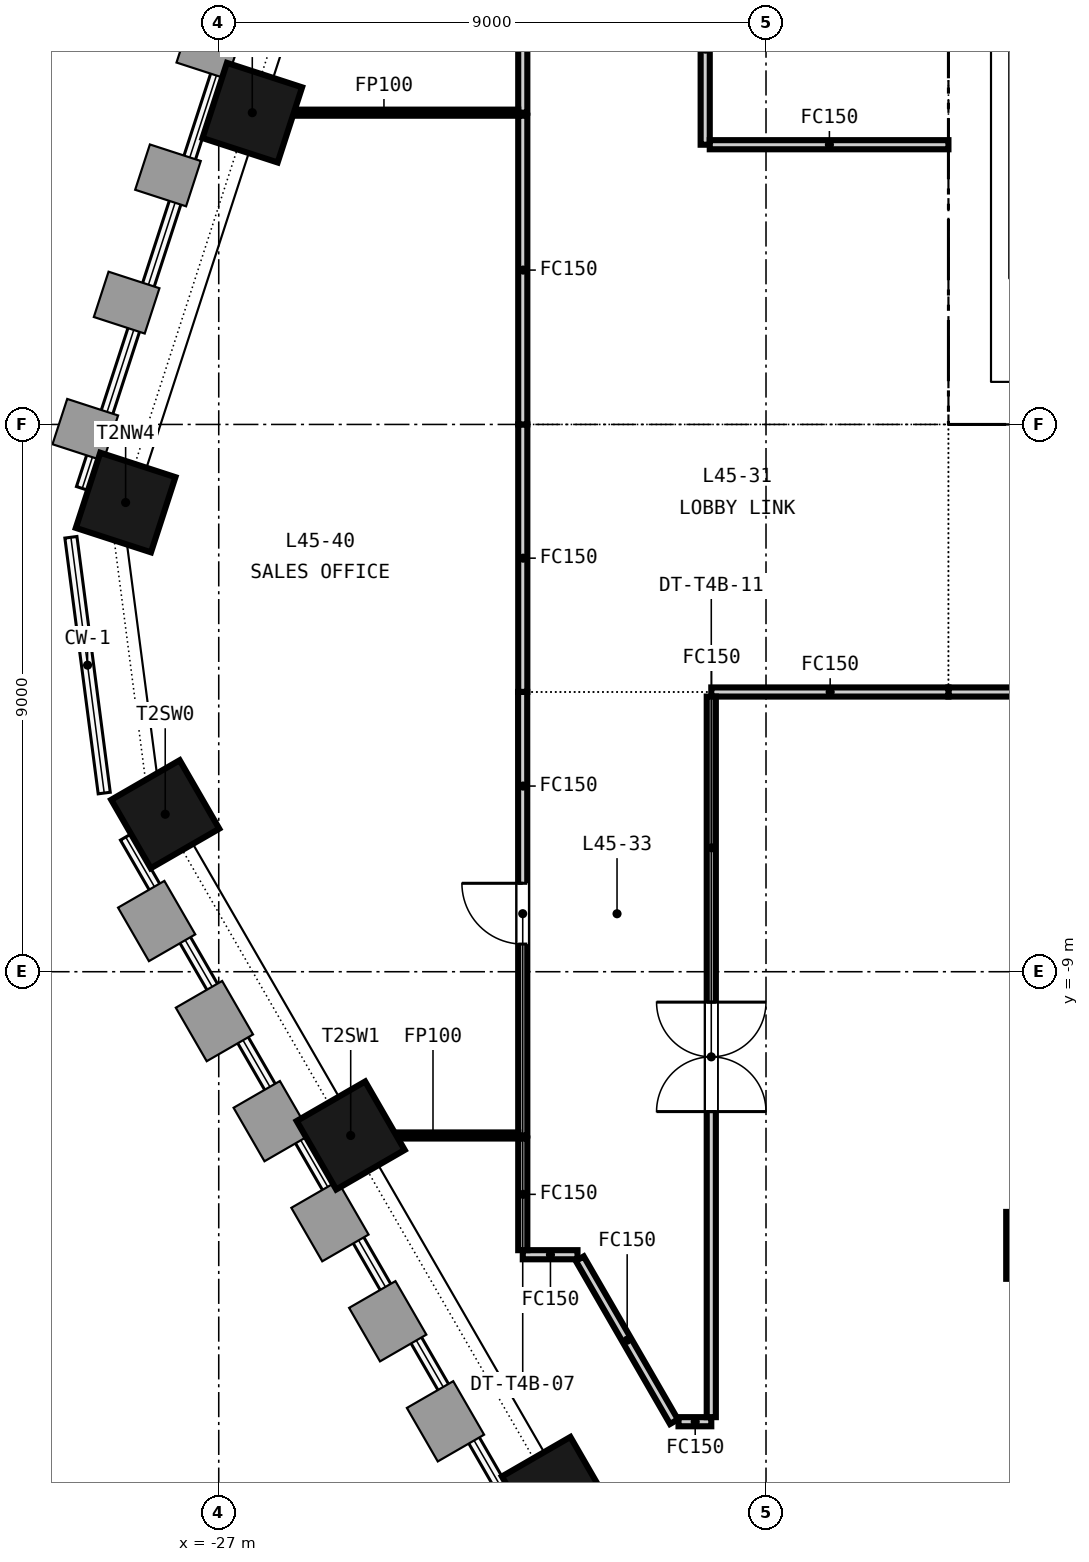
"""IFC4 building model, lengths in metres.
Left out: names, types, materials, properties, quantities, classifications, styles, units other than length and angle.
Written with IfcOpenShell. Run it as: python <this file> out.ifc"""

import sys

from ifc_helpers import new_model, si_unit, direction, frame, frame_2d, origin, origin_2d, place, context, subcontext, project, spatial, rectangle, extrude, element, fill, save


model = new_model("IFC4")
c1 = context("Model", 3, precision=1e-05, world=origin(), true_north=direction((0.0, 1.0)))
c2 = subcontext(c1, "Body", "Model", "MODEL_VIEW")
j1 = project(units=[si_unit("LENGTHUNIT", "METRE"), si_unit("PLANEANGLEUNIT", "RADIAN")], contexts=[c1])
p1 = place(None, origin())
s1 = spatial("IfcSite", under=j1, at=p1, CompositionType="ELEMENT")
p2 = place(p1, origin())
s2 = spatial("IfcBuilding", under=s1, at=p2, CompositionType="ELEMENT")
p3 = place(p2, frame((0.0, 0.0, 181.75)))
s3 = spatial("IfcBuildingStorey", under=s2, at=p3, CompositionType="ELEMENT", Elevation=181.75)
p4 = place(p3, frame((-15.0, 0.35, -0.15), z_axis=(0.0, 0.0, 1.0), x_axis=(1.0, 0.0, 0.0)))
e1 = element("IfcWall", 1, at=p4, inside=s3, PredefinedType="SOLIDWALL", context=c2, shape_type="SweptSolid", body=[
    extrude(rectangle(XDim=30.0, YDim=0.7, at=frame_2d((15.0, 0.0))), origin(), (0.0, 0.0, 1.0), 3.65),
])
p5 = place(p4, frame((5.8, 0.0, 0.15)))
e2 = element("IfcOpeningElement", 2, at=p5, cuts=e1, PredefinedType="OPENING", context=c2, shape_type="SweptSolid", body=[
    extrude(rectangle(XDim=2.4, YDim=2.4, at=frame_2d((1.2, 1.2))), frame((0.0, 0.36, 0.0), z_axis=(0.0, -1.0, 0.0), x_axis=(1.0, 0.0, 0.0)), (0.0, 0.0, 1.0), 0.72),
])
p6 = place(p4, frame((13.8, 0.0, 0.15)))
e3 = element("IfcOpeningElement", 3, at=p6, cuts=e1, PredefinedType="OPENING", context=c2, shape_type="SweptSolid", body=[
    extrude(rectangle(XDim=2.4, YDim=2.4, at=frame_2d((1.2, 1.2))), frame((0.0, 0.36, 0.0), z_axis=(0.0, -1.0, 0.0), x_axis=(1.0, 0.0, 0.0)), (0.0, 0.0, 1.0), 0.72),
])
p7 = place(p4, frame((21.8, 0.0, 0.15)))
e4 = element("IfcOpeningElement", 4, at=p7, cuts=e1, PredefinedType="OPENING", context=c2, shape_type="SweptSolid", body=[
    extrude(rectangle(XDim=2.4, YDim=2.4, at=frame_2d((1.2, 1.2))), frame((0.0, 0.36, 0.0), z_axis=(0.0, -1.0, 0.0), x_axis=(1.0, 0.0, 0.0)), (0.0, 0.0, 1.0), 0.72),
])
p8 = place(p4, frame((1.5, 0.0, 0.15)))
e5 = element("IfcOpeningElement", 5, at=p8, cuts=e1, PredefinedType="OPENING", context=c2, shape_type="SweptSolid", body=[
    extrude(rectangle(XDim=1.2, YDim=2.1, at=frame_2d((0.6, 1.05))), frame((0.0, 0.36, 0.0), z_axis=(0.0, -1.0, 0.0), x_axis=(1.0, 0.0, 0.0)), (0.0, 0.0, 1.0), 0.72),
])
p9 = place(p4, frame((27.3, 0.0, 0.15)))
e6 = element("IfcOpeningElement", 6, at=p9, cuts=e1, PredefinedType="OPENING", context=c2, shape_type="SweptSolid", body=[
    extrude(rectangle(XDim=1.2, YDim=2.1, at=frame_2d((0.6, 1.05))), frame((0.0, 0.36, 0.0), z_axis=(0.0, -1.0, 0.0), x_axis=(1.0, 0.0, 0.0)), (0.0, 0.0, 1.0), 0.72),
])
p10 = place(p3, frame((-14.65, 0.7, -0.15), z_axis=(0.0, 0.0, 1.0), x_axis=(0.0, 1.0, 0.0)))
e7 = element("IfcWall", 7, at=p10, inside=s3, PredefinedType="SOLIDWALL", context=c2, shape_type="SweptSolid", body=[
    extrude(rectangle(XDim=13.6, YDim=0.7, at=frame_2d((6.8, 0.0))), origin(), (0.0, 0.0, 1.0), 3.65),
])
for number, where, z_axis, x_axis in (
    (8, (-26.448, 5.127, -0.15), (0.0, 0.0, 1.0), (-0.309, -0.951, 0.0)),
    (9, (-28.531, -1.284, -0.15), (0.0, 0.0, 1.0), (-0.309, -0.951, 0.0)),
    (10, (-27.88, -6.41, -0.15), (0.0, 0.0, 1.0), (0.5, -0.866, 0.0)),
    (11, (-24.83, -11.693, -0.15), (0.0, 0.0, 1.0), (0.5, -0.866, 0.0)),
    (12, (-21.455, -17.539, -0.15), (0.0, 0.0, 1.0), (0.5, -0.866, 0.0)),
):
    element("IfcColumn", number, at=place(p3, frame(where, z_axis=z_axis, x_axis=x_axis)), inside=s3, PredefinedType="COLUMN", context=c2, shape_type="SweptSolid", body=[
        extrude(rectangle(XDim=1.3, YDim=1.3, at=origin_2d()), origin(), (0.0, 0.0, 1.0), 3.65),
    ])
p11 = place(p3, frame((-13.5, -13.5, -0.15), z_axis=(0.0, 0.0, 1.0), x_axis=(1.0, 0.0, 0.0)))
e13 = element("IfcColumn", 13, at=p11, inside=s3, PredefinedType="COLUMN", context=c2, shape_type="SweptSolid", body=[
    extrude(rectangle(XDim=1.1, YDim=1.1, at=origin_2d()), origin(), (0.0, 0.0, 1.0), 3.65),
])
p12 = place(p3, frame((-14.15, 0.7, 0.0), z_axis=(0.0, 0.0, 1.0), x_axis=(0.0, 1.0, 0.0)))
e14 = element("IfcWall", 14, at=p12, inside=s3, PredefinedType="SOLIDWALL", context=c2, shape_type="SweptSolid", body=[
    extrude(rectangle(XDim=13.6, YDim=0.3, at=frame_2d((6.8, 0.0))), origin(), (0.0, 0.0, 1.0), 3.5),
])
p13 = place(p3, frame((0.095, -4.4, 0.0), z_axis=(0.0, 0.0, 1.0), x_axis=(-1.0, 0.0, 0.0)))
e15 = element("IfcWall", 15, at=p13, inside=s3, PredefinedType="PARTITIONING", context=c2, shape_type="SweptSolid", body=[
    extrude(rectangle(XDim=15.095, YDim=0.15, at=frame_2d((7.547, 0.0))), origin(), (0.0, 0.0, 1.0), 2.741),
])
p14 = place(p13, frame((6.647, 0.0, 0.0)))
e16 = element("IfcOpeningElement", 16, at=p14, cuts=e15, PredefinedType="OPENING", context=c2, shape_type="SweptSolid", body=[
    extrude(rectangle(XDim=1.8, YDim=2.1, at=frame_2d((0.9, 1.05))), frame((0.0, 0.085, 0.0), z_axis=(0.0, -1.0, 0.0), x_axis=(1.0, 0.0, 0.0)), (0.0, 0.0, 1.0), 0.17),
])
p15 = place(p3, frame((-15.0, -4.4, 0.0), z_axis=(0.0, 0.0, 1.0), x_axis=(-1.0, 0.0, 0.0)))
e17 = element("IfcWall", 17, at=p15, inside=s3, PredefinedType="PARTITIONING", context=c2, shape_type="SweptSolid", body=[
    extrude(rectangle(XDim=3.9, YDim=0.15, at=frame_2d((1.95, 0.0))), origin(), (0.0, 0.0, 1.0), 2.741),
])
p16 = place(p3, frame((-19.0, 7.743, 0.0), z_axis=(0.0, 0.0, 1.0), x_axis=(0.0, -1.0, 0.0)))
e18 = element("IfcWall", 18, at=p16, inside=s3, PredefinedType="PARTITIONING", context=c2, shape_type="SweptSolid", body=[
    extrude(rectangle(XDim=3.143, YDim=0.15, at=frame_2d((1.571, 0.0))), origin(), (0.0, 0.0, 1.0), 2.741),
])
p17 = place(p3, frame((-22.0, -11.693, 0.0), z_axis=(0.0, 0.0, 1.0), x_axis=(-0.000267728647, 0.999999964161, 0.0)))
e19 = element("IfcWall", 19, at=p17, inside=s3, PredefinedType="PARTITIONING", context=c2, shape_type="SweptSolid", body=[
    extrude(rectangle(XDim=7.295, YDim=0.15, at=frame_2d((3.647, 0.0))), origin(), (0.0, 0.0, 1.0), 2.741),
])
p18 = place(p17, frame((3.147, 0.0, 0.0)))
e20 = element("IfcOpeningElement", 20, at=p18, cuts=e19, PredefinedType="OPENING", context=c2, shape_type="SweptSolid", body=[
    extrude(rectangle(XDim=1.0, YDim=2.1, at=frame_2d((0.5, 1.05))), frame((0.0, 0.085, 0.0), z_axis=(0.0, -1.0, 0.0), x_axis=(1.0, 0.0, 0.0)), (0.0, 0.0, 1.0), 0.17),
])
p19 = place(p3, frame((-21.1, -13.654, 0.0), z_axis=(0.0, 0.0, 1.0), x_axis=(-1.0, 0.0, 0.0)))
e21 = element("IfcWall", 21, at=p19, inside=s3, PredefinedType="PARTITIONING", context=c2, shape_type="SweptSolid", body=[
    extrude(rectangle(XDim=0.9, YDim=0.15, at=frame_2d((0.45, 0.0))), origin(), (0.0, 0.0, 1.0), 2.741),
])
p20 = place(p3, frame((-19.514, -16.4, 0.0), z_axis=(0.0, 0.0, 1.0), x_axis=(-0.500184316454, 0.865918962475, 0.0)))
e22 = element("IfcWall", 22, at=p20, inside=s3, PredefinedType="PARTITIONING", context=c2, shape_type="SweptSolid", body=[
    extrude(rectangle(XDim=3.096, YDim=0.15, at=frame_2d((1.548, 0.0))), origin(), (0.0, 0.0, 1.0), 2.741),
])
p21 = place(p3, frame((-18.9, -16.4, 0.0), z_axis=(0.0, 0.0, 1.0), x_axis=(-1.0, 0.0, 0.0)))
e23 = element("IfcWall", 23, at=p21, inside=s3, PredefinedType="PARTITIONING", context=c2, shape_type="SweptSolid", body=[
    extrude(rectangle(XDim=0.539, YDim=0.15, at=frame_2d((0.27, 0.0))), origin(), (0.0, 0.0, 1.0), 2.741),
])
p22 = place(p3, frame((-18.9, -4.475, 0.0), z_axis=(0.0, 0.0, 1.0), x_axis=(0.0, -1.0, 0.0)))
e24 = element("IfcWall", 24, at=p22, inside=s3, PredefinedType="PARTITIONING", context=c2, shape_type="SweptSolid", body=[
    extrude(rectangle(XDim=11.85, YDim=0.15, at=frame_2d((5.925, 0.0))), origin(), (0.0, 0.0, 1.0), 2.741),
])
p23 = place(p22, frame((5.025, 0.0, 0.0)))
e25 = element("IfcOpeningElement", 25, at=p23, cuts=e24, PredefinedType="OPENING", context=c2, shape_type="SweptSolid", body=[
    extrude(rectangle(XDim=1.8, YDim=2.1, at=frame_2d((0.9, 1.05))), frame((0.0, 0.085, 0.0), z_axis=(0.0, -1.0, 0.0), x_axis=(1.0, 0.0, 0.0)), (0.0, 0.0, 1.0), 0.17),
])
p24 = place(p3, frame((-18.925, 4.6, 0.0), z_axis=(0.0, 0.0, 1.0), x_axis=(1.0, 0.0, 0.0)))
e26 = element("IfcWall", 26, at=p24, inside=s3, PredefinedType="PARTITIONING", context=c2, shape_type="SweptSolid", body=[
    extrude(rectangle(XDim=3.925, YDim=0.15, at=frame_2d((1.962, 0.0))), origin(), (0.0, 0.0, 1.0), 2.741),
])
p25 = place(p3, frame((-22.0, 5.127, 0.0), z_axis=(0.0, 0.0, 1.0), x_axis=(0.0, 1.0, 0.0)))
e27 = element("IfcWall", 27, at=p25, inside=s3, PredefinedType="PARTITIONING", context=c2, shape_type="SweptSolid", body=[
    extrude(rectangle(XDim=3.13, YDim=0.15, at=frame_2d((1.565, 0.0))), origin(), (0.0, 0.0, 1.0), 2.741),
])
p26 = place(p3, frame((-26.501, 5.127, 0.0), z_axis=(0.0, 0.0, 1.0), x_axis=(1.0, 0.0, 0.0)))
e28 = element("IfcWall", 28, at=p26, inside=s3, PredefinedType="PARTITIONING", context=c2, shape_type="SweptSolid", body=[
    extrude(rectangle(XDim=4.426, YDim=0.1, at=frame_2d((2.213, 0.0))), origin(), (0.0, 0.0, 1.0), 2.741),
])
p27 = place(p3, frame((-22.0, -4.398, 0.0), z_axis=(0.0, 0.0, 1.0), x_axis=(0.0, 1.0, 0.0)))
e29 = element("IfcWall", 29, at=p27, inside=s3, PredefinedType="PARTITIONING", context=c2, shape_type="SweptSolid", body=[
    extrude(rectangle(XDim=4.398, YDim=0.15, at=frame_2d((2.199, 0.0))), origin(), (0.0, 0.0, 1.0), 2.741),
])
p28 = place(p3, frame((-22.0, 0.0, 0.0), z_axis=(0.0, 0.0, 1.0), x_axis=(0.0, 1.0, 0.0)))
e30 = element("IfcWall", 30, at=p28, inside=s3, PredefinedType="PARTITIONING", context=c2, shape_type="SweptSolid", body=[
    extrude(rectangle(XDim=5.077, YDim=0.15, at=frame_2d((2.539, 0.0))), origin(), (0.0, 0.0, 1.0), 2.741),
])
p29 = place(p3, frame((-24.888, -11.693, 0.0), z_axis=(0.0, 0.0, 1.0), x_axis=(1.0, 0.0, 0.0)))
e31 = element("IfcWall", 31, at=p29, inside=s3, PredefinedType="PARTITIONING", context=c2, shape_type="SweptSolid", body=[
    extrude(rectangle(XDim=2.813, YDim=0.1, at=frame_2d((1.406, 0.0))), origin(), (0.0, 0.0, 1.0), 2.741),
])
p30 = place(p3, frame((-22.0, -13.579, 0.0), z_axis=(0.0, 0.0, 1.0), x_axis=(0.0, 1.0, 0.0)))
e32 = element("IfcWall", 32, at=p30, inside=s3, PredefinedType="PARTITIONING", context=c2, shape_type="SweptSolid", body=[
    extrude(rectangle(XDim=1.836, YDim=0.15, at=frame_2d((0.918, 0.0))), origin(), (0.0, 0.0, 1.0), 2.741),
])
p31 = place(p18, origin())
e33 = element("IfcDoor", 33, at=p31, inside=s3, OperationType="SINGLE_SWING_RIGHT", PredefinedType="DOOR", context=c2, shape_type="SweptSolid", body=[
    extrude(rectangle(XDim=1.0, YDim=2.1, at=frame_2d((0.5, 1.05))), frame((0.0, 0.025, 0.0), z_axis=(0.0, -1.0, 0.0), x_axis=(1.0, 0.0, 0.0)), (0.0, 0.0, 1.0), 0.05),
])
fill(e20, e33)
p32 = place(p23, origin())
e34 = element("IfcDoor", 34, at=p32, inside=s3, OperationType="DOUBLE_DOOR_DOUBLE_SWING", PredefinedType="DOOR", context=c2, shape_type="SweptSolid", body=[
    extrude(rectangle(XDim=1.8, YDim=2.1, at=frame_2d((0.9, 1.05))), frame((0.0, 0.025, 0.0), z_axis=(0.0, -1.0, 0.0), x_axis=(1.0, 0.0, 0.0)), (0.0, 0.0, 1.0), 0.05),
])
fill(e25, e34)
save(model, sys.argv[1])
